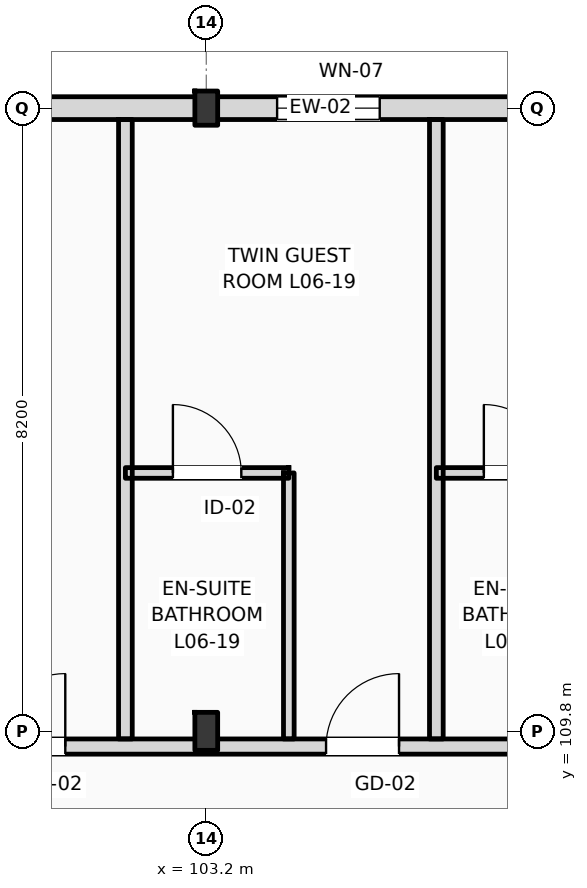
"""IFC4 building model, lengths in metres.
Left out: names, types, materials, properties, quantities, classifications, styles, units other than length and angle.
Written with IfcOpenShell. Run it as: python <this file> out.ifc"""

import sys

from ifc_helpers import new_model, si_unit, direction, frame, frame_2d, origin, origin_2d, place, context, subcontext, project, spatial, rectangle, i_section, extrude, element, fill, save


model = new_model("IFC4")
c1 = context("Model", 3, precision=1e-05, world=origin(), true_north=direction((0.0, 1.0)))
c2 = subcontext(c1, "Body", "Model", "MODEL_VIEW")
j1 = project(units=[si_unit("LENGTHUNIT", "METRE"), si_unit("PLANEANGLEUNIT", "RADIAN")], contexts=[c1])
p1 = place(None, origin())
s1 = spatial("IfcSite", under=j1, at=p1, CompositionType="ELEMENT")
p2 = place(p1, origin())
s2 = spatial("IfcBuilding", under=s1, at=p2, CompositionType="ELEMENT")
p3 = place(p2, frame((0.0, 0.0, 28.2)))
s3 = spatial("IfcBuildingStorey", under=s2, at=p3, CompositionType="ELEMENT", Elevation=28.2)
p4 = place(p3, frame((103.2, 109.8, 0.0), z_axis=(0.0, 0.0, 1.0), x_axis=(1.0, 0.0, 0.0)))
e1 = element("IfcColumn", 1, at=p4, inside=s3, PredefinedType="COLUMN", context=c2, shape_type="SweptSolid", body=[
    extrude(i_section(OverallWidth=0.3, OverallDepth=0.5, WebThickness=0.014, FlangeThickness=0.028, FilletRadius=0.027, at=origin_2d()), origin(), (0.0, 0.0, 1.0), 3.6),
])
p5 = place(p3, frame((103.2, 118.0, 0.0), z_axis=(0.0, 0.0, 1.0), x_axis=(1.0, 0.0, 0.0)))
e2 = element("IfcColumn", 2, at=p5, inside=s3, PredefinedType="COLUMN", context=c2, shape_type="SweptSolid", body=[
    extrude(i_section(OverallWidth=0.3, OverallDepth=0.45, WebThickness=0.014, FlangeThickness=0.026, FilletRadius=0.027, at=origin_2d()), origin(), (0.0, 0.0, 1.0), 3.6),
])
p6 = place(p3, frame((22.5, 118.0, 0.0), z_axis=(0.0, 0.0, 1.0), x_axis=(1.0, 0.0, 0.0)))
e3 = element("IfcWall", 3, at=p6, inside=s3, PredefinedType="STANDARD", context=c2, shape_type="SweptSolid", body=[
    extrude(rectangle(XDim=97.5, YDim=0.3, at=frame_2d((48.75, 0.0))), origin(), (0.0, 0.0, 1.0), 2.8),
])
p7 = place(p6, frame((0.91, 0.0, 0.9)))
e4 = element("IfcOpeningElement", 4, at=p7, cuts=e3, PredefinedType="OPENING", context=c2, shape_type="SweptSolid", body=[
    extrude(rectangle(XDim=0.9, YDim=1.72, at=frame_2d((0.45, 0.86))), frame((0.0, 0.16, 0.0), z_axis=(0.0, -1.0, 0.0), x_axis=(1.0, 0.0, 0.0)), (0.0, 0.0, 1.0), 0.32),
])
p8 = place(p6, frame((6.561, 0.0, 0.0)))
e5 = element("IfcOpeningElement", 5, at=p8, cuts=e3, PredefinedType="OPENING", context=c2, shape_type="SweptSolid", body=[
    extrude(rectangle(XDim=1.2, YDim=2.25, at=frame_2d((0.6, 1.125))), frame((0.0, 0.16, 0.0), z_axis=(0.0, -1.0, 0.0), x_axis=(1.0, 0.0, 0.0)), (0.0, 0.0, 1.0), 0.32),
])
p9 = place(p6, frame((11.477, 0.0, 0.9)))
e6 = element("IfcOpeningElement", 6, at=p9, cuts=e3, PredefinedType="OPENING", context=c2, shape_type="SweptSolid", body=[
    extrude(rectangle(XDim=1.1, YDim=1.5, at=frame_2d((0.55, 0.75))), frame((0.0, 0.16, 0.0), z_axis=(0.0, -1.0, 0.0), x_axis=(1.0, 0.0, 0.0)), (0.0, 0.0, 1.0), 0.32),
])
p10 = place(p6, frame((15.194, 0.0, 0.9)))
e7 = element("IfcOpeningElement", 7, at=p10, cuts=e3, PredefinedType="OPENING", context=c2, shape_type="SweptSolid", body=[
    extrude(rectangle(XDim=1.25, YDim=1.6, at=frame_2d((0.625, 0.8))), frame((0.0, 0.16, 0.0), z_axis=(0.0, -1.0, 0.0), x_axis=(1.0, 0.0, 0.0)), (0.0, 0.0, 1.0), 0.32),
])
p11 = place(p6, frame((19.509, 0.0, 0.9)))
e8 = element("IfcOpeningElement", 8, at=p11, cuts=e3, PredefinedType="OPENING", context=c2, shape_type="SweptSolid", body=[
    extrude(rectangle(XDim=1.4, YDim=1.7, at=frame_2d((0.7, 0.85))), frame((0.0, 0.16, 0.0), z_axis=(0.0, -1.0, 0.0), x_axis=(1.0, 0.0, 0.0)), (0.0, 0.0, 1.0), 0.32),
])
p12 = place(p6, frame((23.258, 0.0, 0.0)))
e9 = element("IfcOpeningElement", 9, at=p12, cuts=e3, PredefinedType="OPENING", context=c2, shape_type="SweptSolid", body=[
    extrude(rectangle(XDim=1.2, YDim=2.25, at=frame_2d((0.6, 1.125))), frame((0.0, 0.16, 0.0), z_axis=(0.0, -1.0, 0.0), x_axis=(1.0, 0.0, 0.0)), (0.0, 0.0, 1.0), 0.32),
])
p13 = place(p6, frame((28.115, 0.0, 0.9)))
e10 = element("IfcOpeningElement", 10, at=p13, cuts=e3, PredefinedType="OPENING", context=c2, shape_type="SweptSolid", body=[
    extrude(rectangle(XDim=1.75, YDim=1.72, at=frame_2d((0.875, 0.86))), frame((0.0, 0.16, 0.0), z_axis=(0.0, -1.0, 0.0), x_axis=(1.0, 0.0, 0.0)), (0.0, 0.0, 1.0), 0.32),
])
p14 = place(p6, frame((31.582, 0.0, 0.9)))
e11 = element("IfcOpeningElement", 11, at=p14, cuts=e3, PredefinedType="OPENING", context=c2, shape_type="SweptSolid", body=[
    extrude(rectangle(XDim=1.35, YDim=1.72, at=frame_2d((0.675, 0.86))), frame((0.0, 0.16, 0.0), z_axis=(0.0, -1.0, 0.0), x_axis=(1.0, 0.0, 0.0)), (0.0, 0.0, 1.0), 0.32),
])
p15 = place(p6, frame((37.379, 0.0, 0.0)))
e12 = element("IfcOpeningElement", 12, at=p15, cuts=e3, PredefinedType="OPENING", context=c2, shape_type="SweptSolid", body=[
    extrude(rectangle(XDim=1.2, YDim=2.25, at=frame_2d((0.6, 1.125))), frame((0.0, 0.16, 0.0), z_axis=(0.0, -1.0, 0.0), x_axis=(1.0, 0.0, 0.0)), (0.0, 0.0, 1.0), 0.32),
])
p16 = place(p6, frame((42.663, 0.0, 0.9)))
e13 = element("IfcOpeningElement", 13, at=p16, cuts=e3, PredefinedType="OPENING", context=c2, shape_type="SweptSolid", body=[
    extrude(rectangle(XDim=1.35, YDim=1.72, at=frame_2d((0.675, 0.86))), frame((0.0, 0.16, 0.0), z_axis=(0.0, -1.0, 0.0), x_axis=(1.0, 0.0, 0.0)), (0.0, 0.0, 1.0), 0.32),
])
p17 = place(p6, frame((45.119, 0.0, 0.9)))
e14 = element("IfcOpeningElement", 14, at=p17, cuts=e3, PredefinedType="OPENING", context=c2, shape_type="SweptSolid", body=[
    extrude(rectangle(XDim=2.871, YDim=1.72, at=frame_2d((1.436, 0.86))), frame((0.0, 0.16, 0.0), z_axis=(0.0, -1.0, 0.0), x_axis=(1.0, 0.0, 0.0)), (0.0, 0.0, 1.0), 0.32),
])
p18 = place(p6, frame((50.41, 0.0, 0.9)))
e15 = element("IfcOpeningElement", 15, at=p18, cuts=e3, PredefinedType="OPENING", context=c2, shape_type="SweptSolid", body=[
    extrude(rectangle(XDim=1.8, YDim=1.72, at=frame_2d((0.9, 0.86))), frame((0.0, 0.16, 0.0), z_axis=(0.0, -1.0, 0.0), x_axis=(1.0, 0.0, 0.0)), (0.0, 0.0, 1.0), 0.32),
])
p19 = place(p6, frame((54.375, 0.0, 0.0)))
e16 = element("IfcOpeningElement", 16, at=p19, cuts=e3, PredefinedType="OPENING", context=c2, shape_type="SweptSolid", body=[
    extrude(rectangle(XDim=1.2, YDim=2.25, at=frame_2d((0.6, 1.125))), frame((0.0, 0.16, 0.0), z_axis=(0.0, -1.0, 0.0), x_axis=(1.0, 0.0, 0.0)), (0.0, 0.0, 1.0), 0.32),
])
p20 = place(p6, frame((59.052, 0.0, 0.9)))
e17 = element("IfcOpeningElement", 17, at=p20, cuts=e3, PredefinedType="OPENING", context=c2, shape_type="SweptSolid", body=[
    extrude(rectangle(XDim=1.35, YDim=1.72, at=frame_2d((0.675, 0.86))), frame((0.0, 0.16, 0.0), z_axis=(0.0, -1.0, 0.0), x_axis=(1.0, 0.0, 0.0)), (0.0, 0.0, 1.0), 0.32),
])
p21 = place(p6, frame((62.768, 0.0, 0.9)))
e18 = element("IfcOpeningElement", 18, at=p21, cuts=e3, PredefinedType="OPENING", context=c2, shape_type="SweptSolid", body=[
    extrude(rectangle(XDim=1.5, YDim=1.72, at=frame_2d((0.75, 0.86))), frame((0.0, 0.16, 0.0), z_axis=(0.0, -1.0, 0.0), x_axis=(1.0, 0.0, 0.0)), (0.0, 0.0, 1.0), 0.32),
])
p22 = place(p6, frame((68.498, 0.0, 0.0)))
e19 = element("IfcOpeningElement", 19, at=p22, cuts=e3, PredefinedType="OPENING", context=c2, shape_type="SweptSolid", body=[
    extrude(rectangle(XDim=1.2, YDim=2.25, at=frame_2d((0.6, 1.125))), frame((0.0, 0.16, 0.0), z_axis=(0.0, -1.0, 0.0), x_axis=(1.0, 0.0, 0.0)), (0.0, 0.0, 1.0), 0.32),
])
p23 = place(p6, frame((71.265, 0.0, 0.9)))
e20 = element("IfcOpeningElement", 20, at=p23, cuts=e3, PredefinedType="OPENING", context=c2, shape_type="SweptSolid", body=[
    extrude(rectangle(XDim=0.9, YDim=1.72, at=frame_2d((0.45, 0.86))), frame((0.0, 0.16, 0.0), z_axis=(0.0, -1.0, 0.0), x_axis=(1.0, 0.0, 0.0)), (0.0, 0.0, 1.0), 0.32),
])
p24 = place(p6, frame((76.316, 0.0, 0.9)))
e21 = element("IfcOpeningElement", 21, at=p24, cuts=e3, PredefinedType="OPENING", context=c2, shape_type="SweptSolid", body=[
    extrude(rectangle(XDim=1.95, YDim=1.72, at=frame_2d((0.975, 0.86))), frame((0.0, 0.16, 0.0), z_axis=(0.0, -1.0, 0.0), x_axis=(1.0, 0.0, 0.0)), (0.0, 0.0, 1.0), 0.32),
])
p25 = place(p6, frame((81.632, 0.0, 0.9)))
e22 = element("IfcOpeningElement", 22, at=p25, cuts=e3, PredefinedType="OPENING", context=c2, shape_type="SweptSolid", body=[
    extrude(rectangle(XDim=1.35, YDim=1.72, at=frame_2d((0.675, 0.86))), frame((0.0, 0.16, 0.0), z_axis=(0.0, -1.0, 0.0), x_axis=(1.0, 0.0, 0.0)), (0.0, 0.0, 1.0), 0.32),
])
p26 = place(p6, frame((84.948, 0.0, 0.9)))
e23 = element("IfcOpeningElement", 23, at=p26, cuts=e3, PredefinedType="OPENING", context=c2, shape_type="SweptSolid", body=[
    extrude(rectangle(XDim=2.25, YDim=1.72, at=frame_2d((1.125, 0.86))), frame((0.0, 0.16, 0.0), z_axis=(0.0, -1.0, 0.0), x_axis=(1.0, 0.0, 0.0)), (0.0, 0.0, 1.0), 0.32),
])
p27 = place(p6, frame((90.063, 0.0, 0.9)))
e24 = element("IfcOpeningElement", 24, at=p27, cuts=e3, PredefinedType="OPENING", context=c2, shape_type="SweptSolid", body=[
    extrude(rectangle(XDim=1.8, YDim=1.72, at=frame_2d((0.9, 0.86))), frame((0.0, 0.16, 0.0), z_axis=(0.0, -1.0, 0.0), x_axis=(1.0, 0.0, 0.0)), (0.0, 0.0, 1.0), 0.32),
])
p28 = place(p6, frame((93.529, 0.0, 0.9)))
e25 = element("IfcOpeningElement", 25, at=p28, cuts=e3, PredefinedType="OPENING", context=c2, shape_type="SweptSolid", body=[
    extrude(rectangle(XDim=2.55, YDim=1.72, at=frame_2d((1.275, 0.86))), frame((0.0, 0.16, 0.0), z_axis=(0.0, -1.0, 0.0), x_axis=(1.0, 0.0, 0.0)), (0.0, 0.0, 1.0), 0.32),
])
p29 = place(p3, frame((10.65, 109.6, 0.0), z_axis=(0.0, 0.0, 1.0), x_axis=(1.0, 0.0, 0.0)))
e26 = element("IfcWall", 26, at=p29, inside=s3, PredefinedType="PARTITIONING", context=c2, shape_type="SweptSolid", body=[
    extrude(rectangle(XDim=109.21, YDim=0.2, at=frame_2d((54.605, 0.0))), origin(), (0.0, 0.0, 1.0), 2.8),
])
p30 = place(p29, frame((12.611, 0.0, 0.0)))
e27 = element("IfcOpeningElement", 27, at=p30, cuts=e26, PredefinedType="OPENING", context=c2, shape_type="SweptSolid", body=[
    extrude(rectangle(XDim=1.02, YDim=2.2, at=frame_2d((0.51, 1.1))), frame((0.0, 0.11, 0.0), z_axis=(0.0, -1.0, 0.0), x_axis=(1.0, 0.0, 0.0)), (0.0, 0.0, 1.0), 0.22),
])
p31 = place(p29, frame((19.451, 0.0, 0.0)))
e28 = element("IfcOpeningElement", 28, at=p31, cuts=e26, PredefinedType="OPENING", context=c2, shape_type="SweptSolid", body=[
    extrude(rectangle(XDim=1.02, YDim=2.2, at=frame_2d((0.51, 1.1))), frame((0.0, 0.11, 0.0), z_axis=(0.0, -1.0, 0.0), x_axis=(1.0, 0.0, 0.0)), (0.0, 0.0, 1.0), 0.22),
])
p32 = place(p29, frame((23.842, 0.0, 0.0)))
e29 = element("IfcOpeningElement", 29, at=p32, cuts=e26, PredefinedType="OPENING", context=c2, shape_type="SweptSolid", body=[
    extrude(rectangle(XDim=1.02, YDim=2.2, at=frame_2d((0.51, 1.1))), frame((0.0, 0.11, 0.0), z_axis=(0.0, -1.0, 0.0), x_axis=(1.0, 0.0, 0.0)), (0.0, 0.0, 1.0), 0.22),
])
p33 = place(p29, frame((26.084, 0.0, 0.0)))
e30 = element("IfcOpeningElement", 30, at=p33, cuts=e26, PredefinedType="OPENING", context=c2, shape_type="SweptSolid", body=[
    extrude(rectangle(XDim=1.02, YDim=2.2, at=frame_2d((0.51, 1.1))), frame((0.0, 0.11, 0.0), z_axis=(0.0, -1.0, 0.0), x_axis=(1.0, 0.0, 0.0)), (0.0, 0.0, 1.0), 0.22),
])
p34 = place(p29, frame((32.655, 0.0, 0.0)))
e31 = element("IfcOpeningElement", 31, at=p34, cuts=e26, PredefinedType="OPENING", context=c2, shape_type="SweptSolid", body=[
    extrude(rectangle(XDim=0.96, YDim=2.2, at=frame_2d((0.48, 1.1))), frame((0.0, 0.11, 0.0), z_axis=(0.0, -1.0, 0.0), x_axis=(1.0, 0.0, 0.0)), (0.0, 0.0, 1.0), 0.22),
])
p35 = place(p29, frame((34.895, 0.0, 0.0)))
e32 = element("IfcOpeningElement", 32, at=p35, cuts=e26, PredefinedType="OPENING", context=c2, shape_type="SweptSolid", body=[
    extrude(rectangle(XDim=0.96, YDim=2.2, at=frame_2d((0.48, 1.1))), frame((0.0, 0.11, 0.0), z_axis=(0.0, -1.0, 0.0), x_axis=(1.0, 0.0, 0.0)), (0.0, 0.0, 1.0), 0.22),
])
p36 = place(p29, frame((41.436, 0.0, 0.0)))
e33 = element("IfcOpeningElement", 33, at=p36, cuts=e26, PredefinedType="OPENING", context=c2, shape_type="SweptSolid", body=[
    extrude(rectangle(XDim=0.96, YDim=2.2, at=frame_2d((0.48, 1.1))), frame((0.0, 0.11, 0.0), z_axis=(0.0, -1.0, 0.0), x_axis=(1.0, 0.0, 0.0)), (0.0, 0.0, 1.0), 0.22),
])
p37 = place(p29, frame((43.427, 0.0, 0.0)))
e34 = element("IfcOpeningElement", 34, at=p37, cuts=e26, PredefinedType="OPENING", context=c2, shape_type="SweptSolid", body=[
    extrude(rectangle(XDim=0.96, YDim=2.2, at=frame_2d((0.48, 1.1))), frame((0.0, 0.11, 0.0), z_axis=(0.0, -1.0, 0.0), x_axis=(1.0, 0.0, 0.0)), (0.0, 0.0, 1.0), 0.22),
])
p38 = place(p29, frame((50.218, 0.0, 0.0)))
e35 = element("IfcOpeningElement", 35, at=p38, cuts=e26, PredefinedType="OPENING", context=c2, shape_type="SweptSolid", body=[
    extrude(rectangle(XDim=0.96, YDim=2.2, at=frame_2d((0.48, 1.1))), frame((0.0, 0.11, 0.0), z_axis=(0.0, -1.0, 0.0), x_axis=(1.0, 0.0, 0.0)), (0.0, 0.0, 1.0), 0.22),
])
p39 = place(p29, frame((54.859, 0.0, 0.0)))
e36 = element("IfcOpeningElement", 36, at=p39, cuts=e26, PredefinedType="OPENING", context=c2, shape_type="SweptSolid", body=[
    extrude(rectangle(XDim=0.96, YDim=2.2, at=frame_2d((0.48, 1.1))), frame((0.0, 0.11, 0.0), z_axis=(0.0, -1.0, 0.0), x_axis=(1.0, 0.0, 0.0)), (0.0, 0.0, 1.0), 0.22),
])
p40 = place(p29, frame((59.0, 0.0, 0.0)))
e37 = element("IfcOpeningElement", 37, at=p40, cuts=e26, PredefinedType="OPENING", context=c2, shape_type="SweptSolid", body=[
    extrude(rectangle(XDim=0.96, YDim=2.2, at=frame_2d((0.48, 1.1))), frame((0.0, 0.11, 0.0), z_axis=(0.0, -1.0, 0.0), x_axis=(1.0, 0.0, 0.0)), (0.0, 0.0, 1.0), 0.22),
])
p41 = place(p29, frame((63.39, 0.0, 0.0)))
e38 = element("IfcOpeningElement", 38, at=p41, cuts=e26, PredefinedType="OPENING", context=c2, shape_type="SweptSolid", body=[
    extrude(rectangle(XDim=0.96, YDim=2.2, at=frame_2d((0.48, 1.1))), frame((0.0, 0.11, 0.0), z_axis=(0.0, -1.0, 0.0), x_axis=(1.0, 0.0, 0.0)), (0.0, 0.0, 1.0), 0.22),
])
p42 = place(p29, frame((65.631, 0.0, 0.0)))
e39 = element("IfcOpeningElement", 39, at=p42, cuts=e26, PredefinedType="OPENING", context=c2, shape_type="SweptSolid", body=[
    extrude(rectangle(XDim=0.96, YDim=2.2, at=frame_2d((0.48, 1.1))), frame((0.0, 0.11, 0.0), z_axis=(0.0, -1.0, 0.0), x_axis=(1.0, 0.0, 0.0)), (0.0, 0.0, 1.0), 0.22),
])
p43 = place(p29, frame((72.172, 0.0, 0.0)))
e40 = element("IfcOpeningElement", 40, at=p43, cuts=e26, PredefinedType="OPENING", context=c2, shape_type="SweptSolid", body=[
    extrude(rectangle(XDim=0.96, YDim=2.2, at=frame_2d((0.48, 1.1))), frame((0.0, 0.11, 0.0), z_axis=(0.0, -1.0, 0.0), x_axis=(1.0, 0.0, 0.0)), (0.0, 0.0, 1.0), 0.22),
])
p44 = place(p29, frame((74.413, 0.0, 0.0)))
e41 = element("IfcOpeningElement", 41, at=p44, cuts=e26, PredefinedType="OPENING", context=c2, shape_type="SweptSolid", body=[
    extrude(rectangle(XDim=0.96, YDim=2.2, at=frame_2d((0.48, 1.1))), frame((0.0, 0.11, 0.0), z_axis=(0.0, -1.0, 0.0), x_axis=(1.0, 0.0, 0.0)), (0.0, 0.0, 1.0), 0.22),
])
p45 = place(p29, frame((80.954, 0.0, 0.0)))
e42 = element("IfcOpeningElement", 42, at=p45, cuts=e26, PredefinedType="OPENING", context=c2, shape_type="SweptSolid", body=[
    extrude(rectangle(XDim=0.96, YDim=2.2, at=frame_2d((0.48, 1.1))), frame((0.0, 0.11, 0.0), z_axis=(0.0, -1.0, 0.0), x_axis=(1.0, 0.0, 0.0)), (0.0, 0.0, 1.0), 0.22),
])
p46 = place(p29, frame((83.195, 0.0, 0.0)))
e43 = element("IfcOpeningElement", 43, at=p46, cuts=e26, PredefinedType="OPENING", context=c2, shape_type="SweptSolid", body=[
    extrude(rectangle(XDim=0.96, YDim=2.2, at=frame_2d((0.48, 1.1))), frame((0.0, 0.11, 0.0), z_axis=(0.0, -1.0, 0.0), x_axis=(1.0, 0.0, 0.0)), (0.0, 0.0, 1.0), 0.22),
])
p47 = place(p29, frame((89.735, 0.0, 0.0)))
e44 = element("IfcOpeningElement", 44, at=p47, cuts=e26, PredefinedType="OPENING", context=c2, shape_type="SweptSolid", body=[
    extrude(rectangle(XDim=0.96, YDim=2.2, at=frame_2d((0.48, 1.1))), frame((0.0, 0.11, 0.0), z_axis=(0.0, -1.0, 0.0), x_axis=(1.0, 0.0, 0.0)), (0.0, 0.0, 1.0), 0.22),
])
p48 = place(p29, frame((94.126, 0.0, 0.0)))
e45 = element("IfcOpeningElement", 45, at=p48, cuts=e26, PredefinedType="OPENING", context=c2, shape_type="SweptSolid", body=[
    extrude(rectangle(XDim=0.96, YDim=2.2, at=frame_2d((0.48, 1.1))), frame((0.0, 0.11, 0.0), z_axis=(0.0, -1.0, 0.0), x_axis=(1.0, 0.0, 0.0)), (0.0, 0.0, 1.0), 0.22),
])
p49 = place(p29, frame((98.517, 0.0, 0.0)))
e46 = element("IfcOpeningElement", 46, at=p49, cuts=e26, PredefinedType="OPENING", context=c2, shape_type="SweptSolid", body=[
    extrude(rectangle(XDim=0.96, YDim=2.2, at=frame_2d((0.48, 1.1))), frame((0.0, 0.11, 0.0), z_axis=(0.0, -1.0, 0.0), x_axis=(1.0, 0.0, 0.0)), (0.0, 0.0, 1.0), 0.22),
])
p50 = place(p29, frame((102.908, 0.0, 0.0)))
e47 = element("IfcOpeningElement", 47, at=p50, cuts=e26, PredefinedType="OPENING", context=c2, shape_type="SweptSolid", body=[
    extrude(rectangle(XDim=0.96, YDim=2.2, at=frame_2d((0.48, 1.1))), frame((0.0, 0.11, 0.0), z_axis=(0.0, -1.0, 0.0), x_axis=(1.0, 0.0, 0.0)), (0.0, 0.0, 1.0), 0.22),
])
p51 = place(p29, frame((105.099, 0.0, 0.0)))
e48 = element("IfcOpeningElement", 48, at=p51, cuts=e26, PredefinedType="OPENING", context=c2, shape_type="SweptSolid", body=[
    extrude(rectangle(XDim=0.96, YDim=2.2, at=frame_2d((0.48, 1.1))), frame((0.0, 0.11, 0.0), z_axis=(0.0, -1.0, 0.0), x_axis=(1.0, 0.0, 0.0)), (0.0, 0.0, 1.0), 0.22),
])
p52 = place(p29, frame((2.716, 0.0, 0.0)))
e49 = element("IfcOpeningElement", 49, at=p52, cuts=e26, PredefinedType="OPENING", context=c2, shape_type="SweptSolid", body=[
    extrude(rectangle(XDim=1.35, YDim=2.25, at=frame_2d((0.675, 1.125))), frame((0.0, 0.11, 0.0), z_axis=(0.0, -1.0, 0.0), x_axis=(1.0, 0.0, 0.0)), (0.0, 0.0, 1.0), 0.22),
])
p53 = place(p29, frame((6.65, 0.0, 0.0)))
e50 = element("IfcOpeningElement", 50, at=p53, cuts=e26, PredefinedType="OPENING", context=c2, shape_type="SweptSolid", body=[
    extrude(rectangle(XDim=1.35, YDim=2.25, at=frame_2d((0.675, 1.125))), frame((0.0, 0.11, 0.0), z_axis=(0.0, -1.0, 0.0), x_axis=(1.0, 0.0, 0.0)), (0.0, 0.0, 1.0), 0.22),
])
p54 = place(p29, frame((10.583, 0.0, 0.0)))
e51 = element("IfcOpeningElement", 51, at=p54, cuts=e26, PredefinedType="OPENING", context=c2, shape_type="SweptSolid", body=[
    extrude(rectangle(XDim=1.35, YDim=2.25, at=frame_2d((0.675, 1.125))), frame((0.0, 0.11, 0.0), z_axis=(0.0, -1.0, 0.0), x_axis=(1.0, 0.0, 0.0)), (0.0, 0.0, 1.0), 0.22),
])
p55 = place(p3, frame((102.136, 109.7, 0.0), z_axis=(0.0, 0.0, 1.0), x_axis=(0.0, 1.0, 0.0)))
e52 = element("IfcWall", 52, at=p55, inside=s3, PredefinedType="PARTITIONING", context=c2, shape_type="SweptSolid", body=[
    extrude(rectangle(XDim=8.15, YDim=0.18, at=frame_2d((4.075, 0.0))), origin(), (0.0, 0.0, 1.0), 3.36),
])
p56 = place(p3, frame((106.227, 109.7, 0.0), z_axis=(0.0, 0.0, 1.0), x_axis=(0.0, 1.0, 0.0)))
e53 = element("IfcWall", 53, at=p56, inside=s3, PredefinedType="PARTITIONING", context=c2, shape_type="SweptSolid", body=[
    extrude(rectangle(XDim=8.15, YDim=0.18, at=frame_2d((4.075, 0.0))), origin(), (0.0, 0.0, 1.0), 3.05),
])
p57 = place(p3, frame((104.286, 109.7, 0.0), z_axis=(0.0, 0.0, 1.0), x_axis=(0.0, 1.0, 0.0)))
e54 = element("IfcWall", 54, at=p57, inside=s3, PredefinedType="PARTITIONING", context=c2, shape_type="SweptSolid", body=[
    extrude(rectangle(XDim=3.5, YDim=0.14, at=frame_2d((1.75, 0.0))), origin(), (0.0, 0.0, 1.0), 3.36),
])
p58 = place(p3, frame((102.136, 113.2, 0.0), z_axis=(0.0, 0.0, 1.0), x_axis=(1.0, 0.0, 0.0)))
e55 = element("IfcWall", 55, at=p58, inside=s3, PredefinedType="PARTITIONING", context=c2, shape_type="SweptSolid", body=[
    extrude(rectangle(XDim=2.15, YDim=0.14, at=frame_2d((1.075, 0.0))), origin(), (0.0, 0.0, 1.0), 3.36),
])
p59 = place(p58, frame((0.625, 0.0, 0.0)))
e56 = element("IfcOpeningElement", 56, at=p59, cuts=e55, PredefinedType="OPENING", context=c2, shape_type="SweptSolid", body=[
    extrude(rectangle(XDim=0.9, YDim=2.1, at=frame_2d((0.45, 1.05))), frame((0.0, 0.08, 0.0), z_axis=(0.0, -1.0, 0.0), x_axis=(1.0, 0.0, 0.0)), (0.0, 0.0, 1.0), 0.16),
])
p60 = place(p3, frame((106.227, 113.2, 0.0), z_axis=(0.0, 0.0, 1.0), x_axis=(1.0, 0.0, 0.0)))
e57 = element("IfcWall", 57, at=p60, inside=s3, PredefinedType="PARTITIONING", context=c2, shape_type="SweptSolid", body=[
    extrude(rectangle(XDim=2.15, YDim=0.14, at=frame_2d((1.075, 0.0))), origin(), (0.0, 0.0, 1.0), 3.36),
])
p61 = place(p60, frame((0.625, 0.0, 0.0)))
e58 = element("IfcOpeningElement", 58, at=p61, cuts=e57, PredefinedType="OPENING", context=c2, shape_type="SweptSolid", body=[
    extrude(rectangle(XDim=0.9, YDim=2.1, at=frame_2d((0.45, 1.05))), frame((0.0, 0.08, 0.0), z_axis=(0.0, -1.0, 0.0), x_axis=(1.0, 0.0, 0.0)), (0.0, 0.0, 1.0), 0.16),
])
p62 = place(p25, origin())
e59 = element("IfcWindow", 59, at=p62, inside=s3, PartitioningType="DOUBLE_PANEL_VERTICAL", PredefinedType="WINDOW", context=c2, shape_type="SweptSolid", body=[
    extrude(rectangle(XDim=1.35, YDim=1.72, at=frame_2d((0.675, 0.86))), frame((0.0, 0.03, 0.0), z_axis=(0.0, -1.0, 0.0), x_axis=(1.0, 0.0, 0.0)), (0.0, 0.0, 1.0), 0.06),
])
fill(e22, e59)
p63 = place(p47, origin())
e60 = element("IfcDoor", 60, at=p63, inside=s3, OperationType="SINGLE_SWING_RIGHT", PredefinedType="DOOR", context=c2, shape_type="SweptSolid", body=[
    extrude(rectangle(XDim=0.96, YDim=2.2, at=frame_2d((0.48, 1.1))), frame((0.0, 0.025, 0.0), z_axis=(0.0, -1.0, 0.0), x_axis=(1.0, 0.0, 0.0)), (0.0, 0.0, 1.0), 0.05),
])
fill(e44, e60)
p64 = place(p48, origin())
e61 = element("IfcDoor", 61, at=p64, inside=s3, OperationType="SINGLE_SWING_RIGHT", PredefinedType="DOOR", context=c2, shape_type="SweptSolid", body=[
    extrude(rectangle(XDim=0.96, YDim=2.2, at=frame_2d((0.48, 1.1))), frame((0.0, 0.025, 0.0), z_axis=(0.0, -1.0, 0.0), x_axis=(1.0, 0.0, 0.0)), (0.0, 0.0, 1.0), 0.05),
])
fill(e45, e61)
p65 = place(p59, origin())
e62 = element("IfcDoor", 62, at=p65, inside=s3, OperationType="SINGLE_SWING_LEFT", PredefinedType="DOOR", context=c2, shape_type="SweptSolid", body=[
    extrude(rectangle(XDim=0.9, YDim=2.1, at=frame_2d((0.45, 1.05))), frame((0.0, 0.025, 0.0), z_axis=(0.0, -1.0, 0.0), x_axis=(1.0, 0.0, 0.0)), (0.0, 0.0, 1.0), 0.05),
])
fill(e56, e62)
p66 = place(p61, origin())
e63 = element("IfcDoor", 63, at=p66, inside=s3, OperationType="SINGLE_SWING_LEFT", PredefinedType="DOOR", context=c2, shape_type="SweptSolid", body=[
    extrude(rectangle(XDim=0.9, YDim=2.1, at=frame_2d((0.45, 1.05))), frame((0.0, 0.025, 0.0), z_axis=(0.0, -1.0, 0.0), x_axis=(1.0, 0.0, 0.0)), (0.0, 0.0, 1.0), 0.05),
])
fill(e58, e63)
save(model, sys.argv[1])
